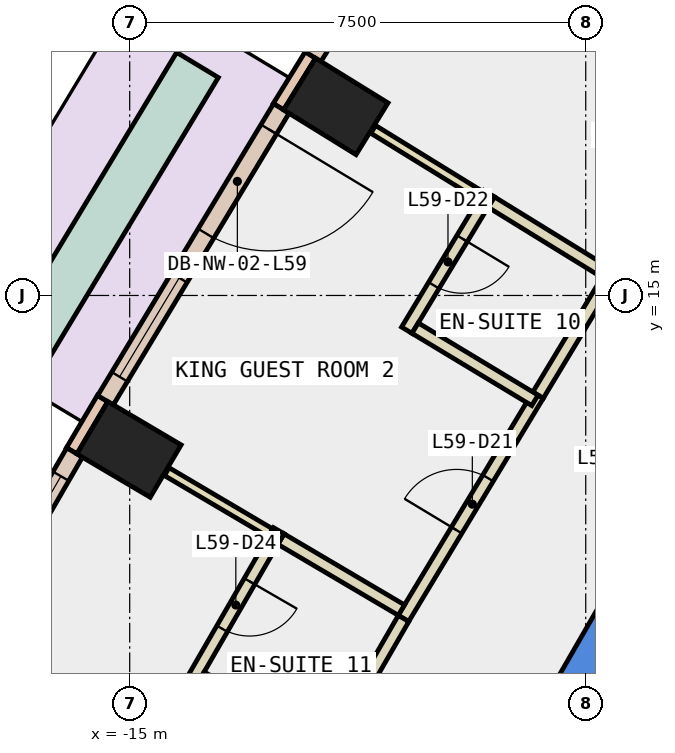
"""IFC4 building model, lengths in metres.
Left out: names, types, materials, properties, quantities, classifications, styles, units other than length and angle.
Written with IfcOpenShell. Run it as: python <this file> out.ifc"""

import sys

from ifc_helpers import new_model, si_unit, direction, frame, frame_2d, origin, origin_2d, place, context, subcontext, project, spatial, polyline, rectangle, outline, extrude, element, fill, save


model = new_model("IFC4")
c1 = context("Model", 3, precision=1e-05, world=origin(), true_north=direction((0.0, 1.0)))
c2 = subcontext(c1, "Body", "Model", "MODEL_VIEW")
j1 = project(units=[si_unit("LENGTHUNIT", "METRE"), si_unit("PLANEANGLEUNIT", "RADIAN")], contexts=[c1])
p1 = place(None, origin())
s1 = spatial("IfcSite", under=j1, at=p1, CompositionType="ELEMENT")
p2 = place(p1, origin())
s2 = spatial("IfcBuilding", under=s1, at=p2, CompositionType="ELEMENT")
p3 = place(p2, frame((0.0, 0.0, 259.4)))
s3 = spatial("IfcBuildingStorey", under=s2, at=p3, CompositionType="ELEMENT", Elevation=259.4)
for number, where, z_axis, x_axis in (
    (1, (-11.61, 18.109, -0.34), (0.0, 0.0, 1.0), (0.526, 0.851, 0.0)),
    (2, (-15.011, 12.468, -0.34), (0.0, 0.0, 1.0), (0.509, 0.861, 0.0)),
):
    element("IfcColumn", number, at=place(p3, frame(where, z_axis=z_axis, x_axis=x_axis)), inside=s3, PredefinedType="COLUMN", context=c2, shape_type="SweptSolid", body=[
        extrude(rectangle(XDim=1.0, YDim=1.4, at=origin_2d()), origin(), (0.0, 0.0, 1.0), 3.6),
    ])
p4 = place(p3, frame((0.0, 0.0, -0.34)))
e3 = element("IfcWall", 3, at=p4, inside=s3, PredefinedType="SHEAR", context=c2, shape_type="SweptSolid", body=[
    extrude(outline(polyline([(-10.535, 4.253), (-10.015, 3.953), (-5.427, 11.9), (-5.774, 12.5), (-10.535, 4.253)])), origin(), (0.0, 0.0, 1.0), 3.6),
])
p5 = place(p3, frame((-12.028, 18.955, 0.0), z_axis=(0.0, 0.0, 1.0), x_axis=(-0.525648735675, -0.850701714282, 0.0)))
e4 = element("IfcWall", 4, at=p5, inside=s3, PredefinedType="STANDARD", context=c2, shape_type="SweptSolid", body=[
    extrude(rectangle(XDim=1.0, YDim=0.2, at=frame_2d((0.5, 0.0))), origin(), (0.0, 0.0, 1.0), 3.26),
])
p6 = place(p3, frame((-15.446, 13.306, 0.0), z_axis=(0.0, 0.0, 1.0), x_axis=(-0.508268432768, -0.861198699634, 0.0)))
e5 = element("IfcWall", 5, at=p6, inside=s3, PredefinedType="STANDARD", context=c2, shape_type="SweptSolid", body=[
    extrude(rectangle(XDim=1.0, YDim=0.2, at=frame_2d((0.5, 0.0))), origin(), (0.0, 0.0, 1.0), 3.26),
])
p7 = place(p3, frame((-8.981, 23.697, 0.0), z_axis=(0.0, 0.0, 1.0), x_axis=(-0.532558226688, -0.846393369059, 0.0)))
e6 = element("IfcWall", 6, at=p7, inside=s3, PredefinedType="STANDARD", context=c2, shape_type="SweptSolid", body=[
    extrude(rectangle(XDim=5.637, YDim=0.3, at=frame_2d((2.818, 0.0))), origin(), (0.0, 0.0, 1.0), 3.26),
])
p8 = place(p7, frame((0.459, 0.0, 0.9)))
e7 = element("IfcOpeningElement", 7, at=p8, cuts=e6, PredefinedType="OPENING", context=c2, shape_type="SweptSolid", body=[
    extrude(rectangle(XDim=1.9, YDim=2.0, at=frame_2d((0.95, 1.0))), frame((0.0, 0.16, 0.0), z_axis=(0.0, -1.0, 0.0), x_axis=(1.0, 0.0, 0.0)), (0.0, 0.0, 1.0), 0.32),
])
p9 = place(p7, frame((3.278, 0.0, 0.9)))
e8 = element("IfcOpeningElement", 8, at=p9, cuts=e6, PredefinedType="OPENING", context=c2, shape_type="SweptSolid", body=[
    extrude(rectangle(XDim=1.9, YDim=2.0, at=frame_2d((0.95, 1.0))), frame((0.0, 0.16, 0.0), z_axis=(0.0, -1.0, 0.0), x_axis=(1.0, 0.0, 0.0)), (0.0, 0.0, 1.0), 0.32),
])
p10 = place(p3, frame((-12.506, 18.076, 0.0), z_axis=(0.0, 0.0, 1.0), x_axis=(-0.516269519619, -0.856426169096, 0.0)))
e9 = element("IfcWall", 9, at=p10, inside=s3, PredefinedType="STANDARD", context=c2, shape_type="SweptSolid", body=[
    extrude(rectangle(XDim=5.603, YDim=0.3, at=frame_2d((2.802, 0.0))), origin(), (0.0, 0.0, 1.0), 3.26),
])
p11 = place(p10, frame((0.401, 0.0, 0.0)))
e10 = element("IfcOpeningElement", 10, at=p11, cuts=e9, PredefinedType="OPENING", context=c2, shape_type="SweptSolid", body=[
    extrude(rectangle(XDim=2.0, YDim=2.4, at=frame_2d((1.0, 1.2))), frame((0.0, 0.16, 0.0), z_axis=(0.0, -1.0, 0.0), x_axis=(1.0, 0.0, 0.0)), (0.0, 0.0, 1.0), 0.32),
])
p12 = place(p10, frame((3.253, 0.0, 0.9)))
e11 = element("IfcOpeningElement", 11, at=p12, cuts=e9, PredefinedType="OPENING", context=c2, shape_type="SweptSolid", body=[
    extrude(rectangle(XDim=1.9, YDim=2.0, at=frame_2d((0.95, 1.0))), frame((0.0, 0.16, 0.0), z_axis=(0.0, -1.0, 0.0), x_axis=(1.0, 0.0, 0.0)), (0.0, 0.0, 1.0), 0.32),
])
p13 = place(p3, frame((-15.906, 12.418, 0.0), z_axis=(0.0, 0.0, 1.0), x_axis=(-0.500089564757, -0.865973687372, 0.0)))
e12 = element("IfcWall", 12, at=p13, inside=s3, PredefinedType="STANDARD", context=c2, shape_type="SweptSolid", body=[
    extrude(rectangle(XDim=5.603, YDim=0.3, at=frame_2d((2.802, 0.0))), origin(), (0.0, 0.0, 1.0), 3.26),
])
p14 = place(p13, frame((0.451, 0.0, 0.9)))
e13 = element("IfcOpeningElement", 13, at=p14, cuts=e12, PredefinedType="OPENING", context=c2, shape_type="SweptSolid", body=[
    extrude(rectangle(XDim=1.9, YDim=2.0, at=frame_2d((0.95, 1.0))), frame((0.0, 0.16, 0.0), z_axis=(0.0, -1.0, 0.0), x_axis=(1.0, 0.0, 0.0)), (0.0, 0.0, 1.0), 0.32),
])
p15 = place(p13, frame((3.252, 0.0, 0.9)))
e14 = element("IfcOpeningElement", 14, at=p15, cuts=e12, PredefinedType="OPENING", context=c2, shape_type="SweptSolid", body=[
    extrude(rectangle(XDim=1.9, YDim=2.0, at=frame_2d((0.95, 1.0))), frame((0.0, 0.16, 0.0), z_axis=(0.0, -1.0, 0.0), x_axis=(1.0, 0.0, 0.0)), (0.0, 0.0, 1.0), 0.32),
])
p16 = place(p3, frame((-13.885, 18.791, 0.0), z_axis=(0.0, 0.0, 1.0), x_axis=(-0.516301759386, -0.856406733542, 0.0)))
e15 = element("IfcWall", 15, at=p16, inside=s3, PredefinedType="STANDARD", context=c2, shape_type="SweptSolid", body=[
    extrude(rectangle(XDim=5.404, YDim=0.8, at=frame_2d((2.702, 0.0))), origin(), (0.0, 0.0, 1.0), 0.8),
])
p17 = place(p3, frame((-10.498, 9.689, 0.0), z_axis=(0.0, 0.0, 1.0), x_axis=(0.516353342298, 0.856375633643, 0.0)))
e16 = element("IfcWall", 16, at=p17, inside=s3, PredefinedType="PARTITIONING", context=c2, shape_type="SweptSolid", body=[
    extrude(rectangle(XDim=4.288, YDim=0.2, at=frame_2d((2.144, 0.0))), origin(), (0.0, 0.0, 1.0), 3.26),
])
p18 = place(p17, frame((1.694, 0.0, 0.0)))
e17 = element("IfcOpeningElement", 17, at=p18, cuts=e16, PredefinedType="OPENING", context=c2, shape_type="SweptSolid", body=[
    extrude(rectangle(XDim=1.0, YDim=2.1, at=frame_2d((0.5, 1.05))), frame((0.0, 0.11, 0.0), z_axis=(0.0, -1.0, 0.0), x_axis=(1.0, 0.0, 0.0)), (0.0, 0.0, 1.0), 0.22),
])
p19 = place(p3, frame((-8.284, 13.361, 0.0), z_axis=(0.0, 0.0, 1.0), x_axis=(0.516354965559, 0.856374654893, 0.0)))
e18 = element("IfcWall", 18, at=p19, inside=s3, PredefinedType="PARTITIONING", context=c2, shape_type="SweptSolid", body=[
    extrude(rectangle(XDim=2.2, YDim=0.2, at=frame_2d((1.1, 0.0))), origin(), (0.0, 0.0, 1.0), 3.26),
])
p20 = place(p3, frame((-11.696, 7.61, 0.0), z_axis=(0.0, 0.0, 1.0), x_axis=(0.500089422704, 0.865973769406, 0.0)))
e19 = element("IfcWall", 19, at=p20, inside=s3, PredefinedType="PARTITIONING", context=c2, shape_type="SweptSolid", body=[
    extrude(rectangle(XDim=2.399, YDim=0.2, at=frame_2d((1.2, 0.0))), origin(), (0.0, 0.0, 1.0), 3.26),
])
p21 = place(p3, frame((-7.357, 19.423, 0.0), z_axis=(0.0, 0.0, 1.0), x_axis=(0.846270070045, -0.532754135176, 0.0)))
e20 = element("IfcWall", 20, at=p21, inside=s3, PredefinedType="PARTITIONING", context=c2, shape_type="SweptSolid", body=[
    extrude(rectangle(XDim=2.3, YDim=0.2, at=frame_2d((1.15, 0.0))), origin(), (0.0, 0.0, 1.0), 3.26),
])
p22 = place(p3, frame((-9.225, 16.641, 0.0), z_axis=(0.0, 0.0, 1.0), x_axis=(-0.85144868382, 0.524437926566, 0.0)))
e21 = element("IfcWall", 21, at=p22, inside=s3, PredefinedType="PARTITIONING", context=c2, shape_type="SweptSolid", body=[
    extrude(rectangle(XDim=2.08, YDim=0.15, at=frame_2d((1.04, 0.0))), origin(), (0.0, 0.0, 1.0), 3.26),
])
p23 = place(p3, frame((-7.182, 15.383, 0.0), z_axis=(0.0, 0.0, 1.0), x_axis=(-0.851498142432, 0.524357619792, 0.0)))
e22 = element("IfcWall", 22, at=p23, inside=s3, PredefinedType="PARTITIONING", context=c2, shape_type="SweptSolid", body=[
    extrude(rectangle(XDim=2.198, YDim=0.2, at=frame_2d((1.099, 0.0))), origin(), (0.0, 0.0, 1.0), 3.26),
])
p24 = place(p3, frame((-9.088, 16.674, 0.0), z_axis=(0.0, 0.0, 1.0), x_axis=(-0.516780274192, -0.856118069081, 0.0)))
e23 = element("IfcWall", 23, at=p24, inside=s3, PredefinedType="PARTITIONING", context=c2, shape_type="SweptSolid", body=[
    extrude(rectangle(XDim=2.623, YDim=0.2, at=frame_2d((1.311, 0.0))), origin(), (0.0, 0.0, 1.0), 3.26),
])
p25 = place(p24, frame((0.861, 0.0, 0.0)))
e24 = element("IfcOpeningElement", 24, at=p25, cuts=e23, PredefinedType="OPENING", context=c2, shape_type="SweptSolid", body=[
    extrude(rectangle(XDim=0.9, YDim=2.1, at=frame_2d((0.45, 1.05))), frame((0.0, 0.11, 0.0), z_axis=(0.0, -1.0, 0.0), x_axis=(1.0, 0.0, 0.0)), (0.0, 0.0, 1.0), 0.22),
])
p26 = place(p3, frame((-10.306, 14.463, 0.0), z_axis=(0.0, 0.0, 1.0), x_axis=(0.856338986581, -0.51641411683, 0.0)))
e25 = element("IfcWall", 25, at=p26, inside=s3, PredefinedType="PARTITIONING", context=c2, shape_type="SweptSolid", body=[
    extrude(rectangle(XDim=2.301, YDim=0.2, at=frame_2d((1.15, 0.0))), origin(), (0.0, 0.0, 1.0), 3.26),
])
p27 = place(p3, frame((-12.685, 11.096, 0.0), z_axis=(0.0, 0.0, 1.0), x_axis=(-0.861157054724, 0.508338988371, 0.0)))
e26 = element("IfcWall", 26, at=p27, inside=s3, PredefinedType="PARTITIONING", context=c2, shape_type="SweptSolid", body=[
    extrude(rectangle(XDim=1.981, YDim=0.15, at=frame_2d((0.991, 0.0))), origin(), (0.0, 0.0, 1.0), 3.26),
])
p28 = place(p3, frame((-10.532, 9.826, 0.0), z_axis=(0.0, 0.0, 1.0), x_axis=(-0.861311086958, 0.508077958077, 0.0)))
e27 = element("IfcWall", 27, at=p28, inside=s3, PredefinedType="PARTITIONING", context=c2, shape_type="SweptSolid", body=[
    extrude(rectangle(XDim=2.299, YDim=0.2, at=frame_2d((1.149, 0.0))), origin(), (0.0, 0.0, 1.0), 3.26),
])
p29 = place(p3, frame((-12.548, 11.132, 0.0), z_axis=(0.0, 0.0, 1.0), x_axis=(-0.500313606915, -0.865844267022, 0.0)))
e28 = element("IfcWall", 28, at=p29, inside=s3, PredefinedType="PARTITIONING", context=c2, shape_type="SweptSolid", body=[
    extrude(rectangle(XDim=2.824, YDim=0.2, at=frame_2d((1.412, 0.0))), origin(), (0.0, 0.0, 1.0), 3.26),
])
p30 = place(p29, frame((0.962, 0.0, 0.0)))
e29 = element("IfcOpeningElement", 29, at=p30, cuts=e28, PredefinedType="OPENING", context=c2, shape_type="SweptSolid", body=[
    extrude(rectangle(XDim=0.9, YDim=2.1, at=frame_2d((0.45, 1.05))), frame((0.0, 0.11, 0.0), z_axis=(0.0, -1.0, 0.0), x_axis=(1.0, 0.0, 0.0)), (0.0, 0.0, 1.0), 0.22),
])
p31 = place(p3, frame((-13.825, 8.723, 0.0), z_axis=(0.0, 0.0, 1.0), x_axis=(0.866053019151, -0.499952165731, 0.0)))
e30 = element("IfcWall", 30, at=p31, inside=s3, PredefinedType="PARTITIONING", context=c2, shape_type="SweptSolid", body=[
    extrude(rectangle(XDim=2.3, YDim=0.2, at=frame_2d((1.15, 0.0))), origin(), (0.0, 0.0, 1.0), 3.26),
])
p32 = place(p3, frame((-5.03, 9.388, 0.0), z_axis=(0.0, 0.0, 1.0), x_axis=(-0.499978703459, -0.866037698999, 0.0)))
e31 = element("IfcWall", 31, at=p32, inside=s3, PredefinedType="STANDARD", context=c2, shape_type="SweptSolid", body=[
    extrude(rectangle(XDim=6.9, YDim=0.2, at=frame_2d((3.45, 0.0))), origin(), (0.0, 0.0, 1.0), 3.26),
])
p33 = place(p11, origin())
e32 = element("IfcDoor", 32, at=p33, inside=s3, OperationType="SLIDING_TO_LEFT", PredefinedType="DOOR", context=c2, shape_type="SweptSolid", body=[
    extrude(rectangle(XDim=2.0, YDim=2.4, at=frame_2d((1.0, 1.2))), frame((0.0, 0.025, 0.0), z_axis=(0.0, -1.0, 0.0), x_axis=(1.0, 0.0, 0.0)), (0.0, 0.0, 1.0), 0.05),
])
fill(e10, e32)
p34 = place(p12, origin())
e33 = element("IfcWindow", 33, at=p34, inside=s3, PartitioningType="SINGLE_PANEL", PredefinedType="WINDOW", context=c2, shape_type="SweptSolid", body=[
    extrude(rectangle(XDim=1.9, YDim=2.0, at=frame_2d((0.95, 1.0))), frame((0.0, 0.03, 0.0), z_axis=(0.0, -1.0, 0.0), x_axis=(1.0, 0.0, 0.0)), (0.0, 0.0, 1.0), 0.06),
])
fill(e11, e33)
p35 = place(p14, origin())
e34 = element("IfcWindow", 34, at=p35, inside=s3, PartitioningType="SINGLE_PANEL", PredefinedType="WINDOW", context=c2, shape_type="SweptSolid", body=[
    extrude(rectangle(XDim=1.9, YDim=2.0, at=frame_2d((0.95, 1.0))), frame((0.0, 0.03, 0.0), z_axis=(0.0, -1.0, 0.0), x_axis=(1.0, 0.0, 0.0)), (0.0, 0.0, 1.0), 0.06),
])
fill(e13, e34)
p36 = place(p18, origin())
e35 = element("IfcDoor", 35, at=p36, inside=s3, OperationType="SINGLE_SWING_RIGHT", PredefinedType="DOOR", context=c2, shape_type="SweptSolid", body=[
    extrude(rectangle(XDim=1.0, YDim=2.1, at=frame_2d((0.5, 1.05))), frame((0.0, 0.025, 0.0), z_axis=(0.0, -1.0, 0.0), x_axis=(1.0, 0.0, 0.0)), (0.0, 0.0, 1.0), 0.05),
])
fill(e17, e35)
p37 = place(p25, origin())
e36 = element("IfcDoor", 36, at=p37, inside=s3, OperationType="SINGLE_SWING_LEFT", PredefinedType="DOOR", context=c2, shape_type="SweptSolid", body=[
    extrude(rectangle(XDim=0.9, YDim=2.1, at=frame_2d((0.45, 1.05))), frame((0.0, 0.025, 0.0), z_axis=(0.0, -1.0, 0.0), x_axis=(1.0, 0.0, 0.0)), (0.0, 0.0, 1.0), 0.05),
])
fill(e24, e36)
p38 = place(p30, origin())
e37 = element("IfcDoor", 37, at=p38, inside=s3, OperationType="SINGLE_SWING_LEFT", PredefinedType="DOOR", context=c2, shape_type="SweptSolid", body=[
    extrude(rectangle(XDim=0.9, YDim=2.1, at=frame_2d((0.45, 1.05))), frame((0.0, 0.025, 0.0), z_axis=(0.0, -1.0, 0.0), x_axis=(1.0, 0.0, 0.0)), (0.0, 0.0, 1.0), 0.05),
])
fill(e29, e37)
save(model, sys.argv[1])
